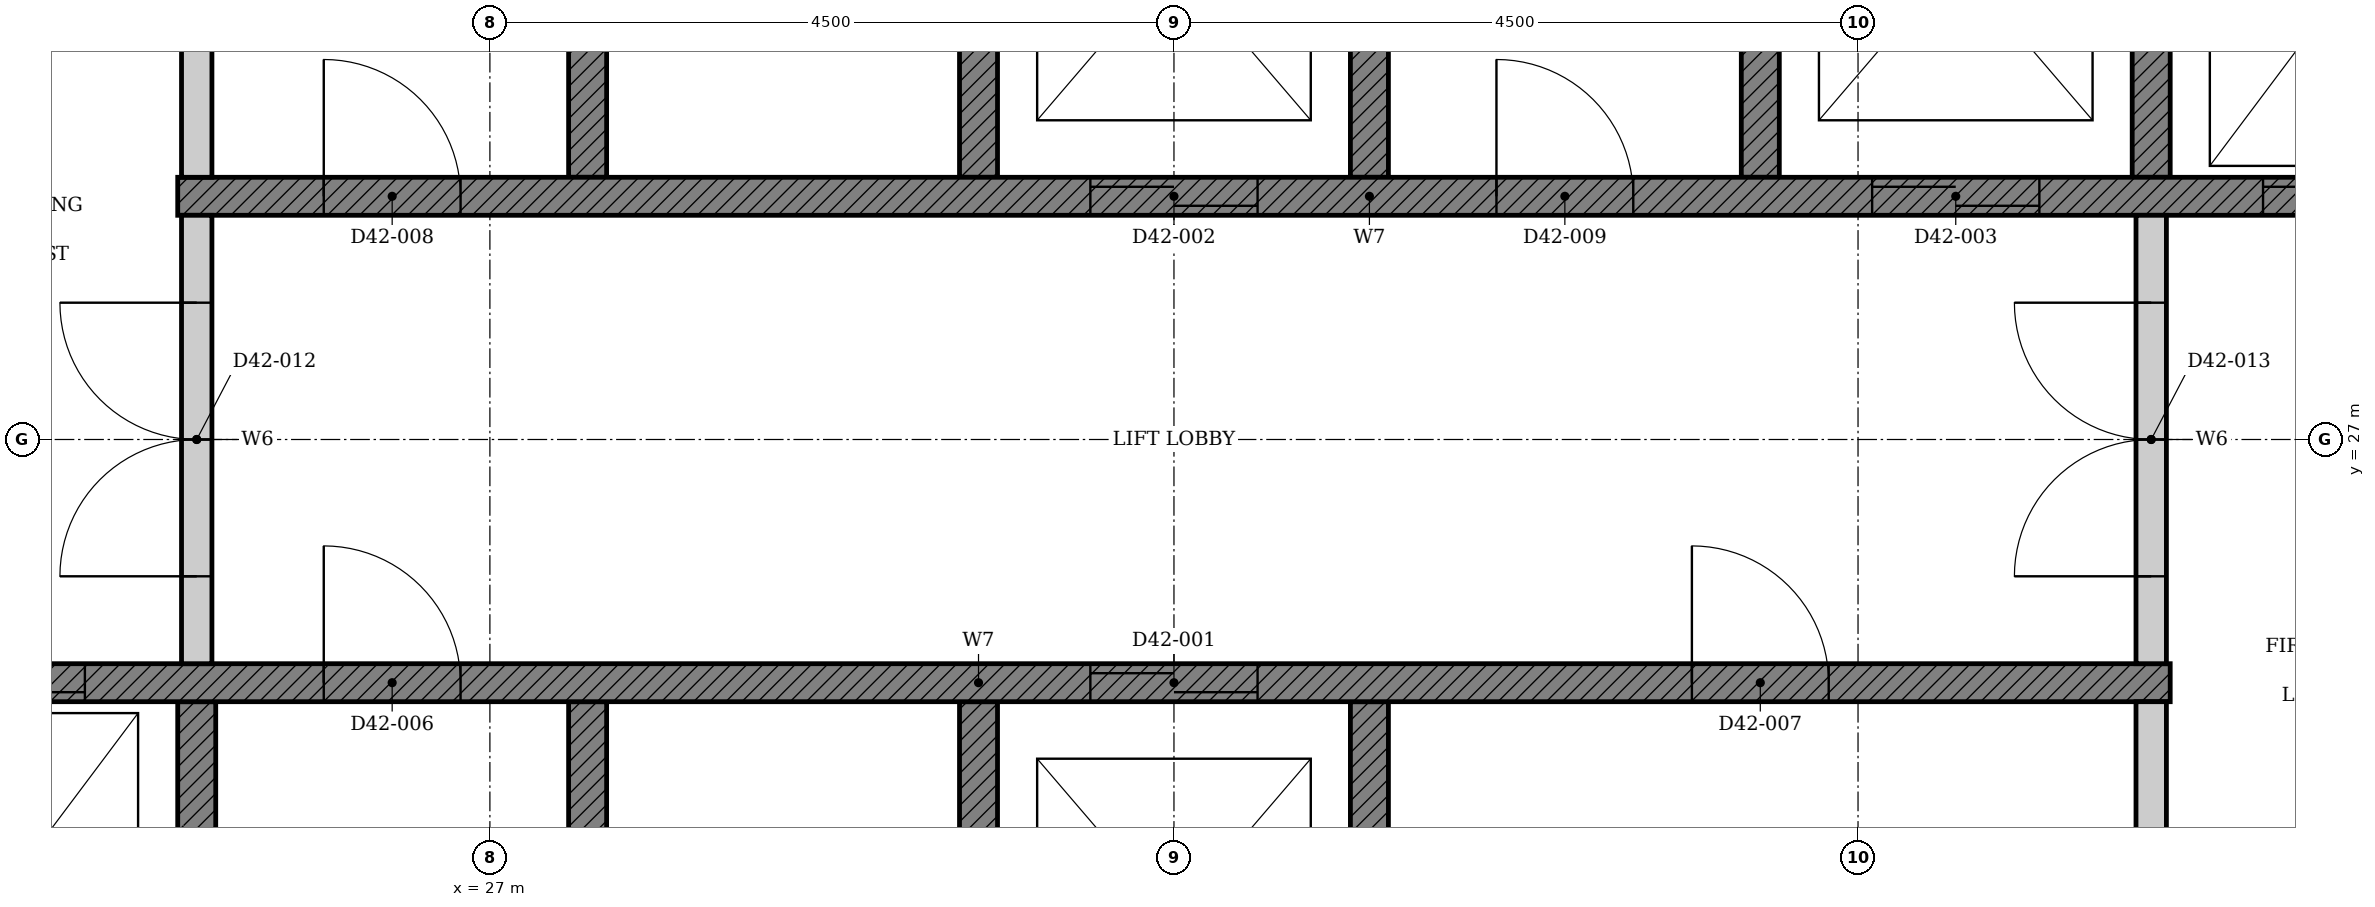
"""IFC4 building model, lengths in metres.
Left out: names, types, materials, properties, quantities, classifications, styles, units other than length and angle.
Written with IfcOpenShell. Run it as: python <this file> out.ifc"""

import sys

from ifc_helpers import new_model, si_unit, direction, frame, frame_2d, origin, place, context, subcontext, project, spatial, polyline, rectangle, outline, extrude, element, fill, save


model = new_model("IFC4")
c1 = context("Model", 3, precision=1e-05, world=origin(), true_north=direction((0.0, 1.0)))
c2 = subcontext(c1, "Body", "Model", "MODEL_VIEW")
j1 = project(units=[si_unit("LENGTHUNIT", "METRE"), si_unit("PLANEANGLEUNIT", "RADIAN")], contexts=[c1])
p1 = place(None, origin())
s1 = spatial("IfcSite", under=j1, at=p1, CompositionType="ELEMENT")
p2 = place(p1, origin())
s2 = spatial("IfcBuilding", under=s1, at=p2, CompositionType="ELEMENT")
p3 = place(p2, frame((0.0, 0.0, 169.1)))
s3 = spatial("IfcBuildingStorey", under=s2, at=p3, CompositionType="ELEMENT", Elevation=169.1)
p4 = place(p3, origin())
e1 = element("IfcWall", 1, at=p4, inside=s3, PredefinedType="SHEAR", context=c2, shape_type="SweptSolid", body=[
    extrude(outline(polyline([(22.375, 22.35), (25.197, 22.35), (25.197, 25.275), (24.947, 25.275), (24.947, 22.65), (22.625, 22.65), (22.625, 25.275), (22.375, 25.275), (22.375, 22.35)])), origin(), (0.0, 0.0, 1.0), 3.4),
])
p5 = place(p3, origin())
e2 = element("IfcWall", 2, at=p5, inside=s3, PredefinedType="SHEAR", context=c2, shape_type="SweptSolid", body=[
    extrude(outline(polyline([(27.518, 22.35), (32.911, 22.35), (32.911, 25.275), (32.661, 25.275), (32.661, 22.65), (30.339, 22.65), (30.339, 25.275), (30.089, 25.275), (30.089, 22.65), (27.768, 22.65), (27.768, 25.275), (27.518, 25.275), (27.518, 22.35)])), origin(), (0.0, 0.0, 1.0), 3.4),
])
p6 = place(p3, origin())
e3 = element("IfcWall", 3, at=p6, inside=s3, PredefinedType="SHEAR", context=c2, shape_type="SweptSolid", body=[
    extrude(outline(polyline([(27.518, 28.725), (27.768, 28.725), (27.768, 31.35), (30.089, 31.35), (30.089, 28.725), (30.339, 28.725), (30.339, 31.35), (32.661, 31.35), (32.661, 28.725), (32.911, 28.725), (32.911, 31.65), (27.518, 31.65), (27.518, 28.725)])), origin(), (0.0, 0.0, 1.0), 3.4),
])
p7 = place(p3, origin())
e4 = element("IfcWall", 4, at=p7, inside=s3, PredefinedType="SHEAR", context=c2, shape_type="SweptSolid", body=[
    extrude(outline(polyline([(35.232, 28.725), (35.482, 28.725), (35.482, 31.35), (37.803, 31.35), (37.803, 28.725), (38.053, 28.725), (38.053, 31.35), (40.375, 31.35), (40.375, 28.725), (40.625, 28.725), (40.625, 31.65), (35.232, 31.65), (35.232, 28.725)])), origin(), (0.0, 0.0, 1.0), 3.4),
])
p8 = place(p3, frame((22.375, 25.4, 0.0), z_axis=(0.0, 0.0, 1.0), x_axis=(1.0, 0.0, 0.0)))
e5 = element("IfcWall", 5, at=p8, inside=s3, PredefinedType="SHEAR", context=c2, shape_type="SweptSolid", body=[
    extrude(rectangle(XDim=15.678, YDim=0.25, at=frame_2d((7.839, 0.0))), origin(), (0.0, 0.0, 1.0), 3.4),
])
p9 = place(p8, frame((8.575, 0.0, 0.0)))
e6 = element("IfcOpeningElement", 6, at=p9, cuts=e5, PredefinedType="OPENING", context=c2, shape_type="SweptSolid", body=[
    extrude(rectangle(XDim=1.1, YDim=2.1, at=frame_2d((0.55, 1.05))), frame((0.0, 0.135, 0.0), z_axis=(0.0, -1.0, 0.0), x_axis=(1.0, 0.0, 0.0)), (0.0, 0.0, 1.0), 0.27),
])
p10 = place(p8, frame((0.861, 0.0, 0.0)))
e7 = element("IfcOpeningElement", 7, at=p10, cuts=e5, PredefinedType="OPENING", context=c2, shape_type="SweptSolid", body=[
    extrude(rectangle(XDim=1.1, YDim=2.1, at=frame_2d((0.55, 1.05))), frame((0.0, 0.135, 0.0), z_axis=(0.0, -1.0, 0.0), x_axis=(1.0, 0.0, 0.0)), (0.0, 0.0, 1.0), 0.27),
])
p11 = place(p8, frame((3.532, 0.0, 0.0)))
e8 = element("IfcOpeningElement", 8, at=p11, cuts=e5, PredefinedType="OPENING", context=c2, shape_type="SweptSolid", body=[
    extrude(rectangle(XDim=0.9, YDim=2.1, at=frame_2d((0.45, 1.05))), frame((0.0, 0.135, 0.0), z_axis=(0.0, -1.0, 0.0), x_axis=(1.0, 0.0, 0.0)), (0.0, 0.0, 1.0), 0.27),
])
p12 = place(p8, frame((12.532, 0.0, 0.0)))
e9 = element("IfcOpeningElement", 9, at=p12, cuts=e5, PredefinedType="OPENING", context=c2, shape_type="SweptSolid", body=[
    extrude(rectangle(XDim=0.9, YDim=2.1, at=frame_2d((0.45, 1.05))), frame((0.0, 0.135, 0.0), z_axis=(0.0, -1.0, 0.0), x_axis=(1.0, 0.0, 0.0)), (0.0, 0.0, 1.0), 0.27),
])
p13 = place(p3, frame((24.947, 28.6, 0.0), z_axis=(0.0, 0.0, 1.0), x_axis=(1.0, 0.0, 0.0)))
e10 = element("IfcWall", 10, at=p13, inside=s3, PredefinedType="SHEAR", context=c2, shape_type="SweptSolid", body=[
    extrude(rectangle(XDim=15.678, YDim=0.25, at=frame_2d((7.839, 0.0))), origin(), (0.0, 0.0, 1.0), 3.4),
])
p14 = place(p13, frame((6.004, 0.0, 0.0)))
e11 = element("IfcOpeningElement", 11, at=p14, cuts=e10, PredefinedType="OPENING", context=c2, shape_type="SweptSolid", body=[
    extrude(rectangle(XDim=1.1, YDim=2.1, at=frame_2d((0.55, 1.05))), frame((0.0, 0.135, 0.0), z_axis=(0.0, -1.0, 0.0), x_axis=(1.0, 0.0, 0.0)), (0.0, 0.0, 1.0), 0.27),
])
p15 = place(p13, frame((11.146, 0.0, 0.0)))
e12 = element("IfcOpeningElement", 12, at=p15, cuts=e10, PredefinedType="OPENING", context=c2, shape_type="SweptSolid", body=[
    extrude(rectangle(XDim=1.1, YDim=2.1, at=frame_2d((0.55, 1.05))), frame((0.0, 0.135, 0.0), z_axis=(0.0, -1.0, 0.0), x_axis=(1.0, 0.0, 0.0)), (0.0, 0.0, 1.0), 0.27),
])
p16 = place(p13, frame((13.718, 0.0, 0.0)))
e13 = element("IfcOpeningElement", 13, at=p16, cuts=e10, PredefinedType="OPENING", context=c2, shape_type="SweptSolid", body=[
    extrude(rectangle(XDim=1.1, YDim=2.1, at=frame_2d((0.55, 1.05))), frame((0.0, 0.135, 0.0), z_axis=(0.0, -1.0, 0.0), x_axis=(1.0, 0.0, 0.0)), (0.0, 0.0, 1.0), 0.27),
])
p17 = place(p13, frame((0.961, 0.0, 0.0)))
e14 = element("IfcOpeningElement", 14, at=p17, cuts=e10, PredefinedType="OPENING", context=c2, shape_type="SweptSolid", body=[
    extrude(rectangle(XDim=0.9, YDim=2.1, at=frame_2d((0.45, 1.05))), frame((0.0, 0.135, 0.0), z_axis=(0.0, -1.0, 0.0), x_axis=(1.0, 0.0, 0.0)), (0.0, 0.0, 1.0), 0.27),
])
p18 = place(p13, frame((8.675, 0.0, 0.0)))
e15 = element("IfcOpeningElement", 15, at=p18, cuts=e10, PredefinedType="OPENING", context=c2, shape_type="SweptSolid", body=[
    extrude(rectangle(XDim=0.9, YDim=2.1, at=frame_2d((0.45, 1.05))), frame((0.0, 0.135, 0.0), z_axis=(0.0, -1.0, 0.0), x_axis=(1.0, 0.0, 0.0)), (0.0, 0.0, 1.0), 0.27),
])
for number, where, z_axis, x_axis in (
    (16, (37.928, 22.65, 0.0), (0.0, 0.0, 1.0), (0.0, 1.0, 0.0)),
    (17, (25.072, 28.725, 0.0), (0.0, 0.0, 1.0), (0.0, 1.0, 0.0)),
):
    element("IfcWall", number, at=place(p3, frame(where, z_axis=z_axis, x_axis=x_axis)), inside=s3, PredefinedType="PARTITIONING", context=c2, shape_type="SweptSolid", body=[
        extrude(rectangle(XDim=2.625, YDim=0.2, at=frame_2d((1.312, 0.0))), origin(), (0.0, 0.0, 1.0), 3.4),
    ])
p19 = place(p3, frame((25.072, 25.525, 0.0), z_axis=(0.0, 0.0, 1.0), x_axis=(0.0, 1.0, 0.0)))
e18 = element("IfcWall", 18, at=p19, inside=s3, PredefinedType="PARTITIONING", context=c2, shape_type="SweptSolid", body=[
    extrude(rectangle(XDim=2.95, YDim=0.2, at=frame_2d((1.475, 0.0))), origin(), (0.0, 0.0, 1.0), 3.4),
])
p20 = place(p19, frame((0.575, 0.0, 0.0)))
e19 = element("IfcOpeningElement", 19, at=p20, cuts=e18, PredefinedType="OPENING", context=c2, shape_type="SweptSolid", body=[
    extrude(rectangle(XDim=1.8, YDim=2.1, at=frame_2d((0.9, 1.05))), frame((0.0, 0.11, 0.0), z_axis=(0.0, -1.0, 0.0), x_axis=(1.0, 0.0, 0.0)), (0.0, 0.0, 1.0), 0.22),
])
p21 = place(p3, frame((37.928, 25.525, 0.0), z_axis=(0.0, 0.0, 1.0), x_axis=(0.0, 1.0, 0.0)))
e20 = element("IfcWall", 20, at=p21, inside=s3, PredefinedType="PARTITIONING", context=c2, shape_type="SweptSolid", body=[
    extrude(rectangle(XDim=2.95, YDim=0.2, at=frame_2d((1.475, 0.0))), origin(), (0.0, 0.0, 1.0), 3.4),
])
p22 = place(p21, frame((0.575, 0.0, 0.0)))
e21 = element("IfcOpeningElement", 21, at=p22, cuts=e20, PredefinedType="OPENING", context=c2, shape_type="SweptSolid", body=[
    extrude(rectangle(XDim=1.8, YDim=2.1, at=frame_2d((0.9, 1.05))), frame((0.0, 0.11, 0.0), z_axis=(0.0, -1.0, 0.0), x_axis=(1.0, 0.0, 0.0)), (0.0, 0.0, 1.0), 0.22),
])
p23 = place(p9, origin())
e22 = element("IfcDoor", 22, at=p23, inside=s3, OperationType="DOUBLE_DOOR_SLIDING", PredefinedType="DOOR", context=c2, shape_type="SweptSolid", body=[
    extrude(rectangle(XDim=1.1, YDim=2.1, at=frame_2d((0.55, 1.05))), frame((0.0, 0.025, 0.0), z_axis=(0.0, -1.0, 0.0), x_axis=(1.0, 0.0, 0.0)), (0.0, 0.0, 1.0), 0.05),
])
fill(e6, e22)
p24 = place(p14, origin())
e23 = element("IfcDoor", 23, at=p24, inside=s3, OperationType="DOUBLE_DOOR_SLIDING", PredefinedType="DOOR", context=c2, shape_type="SweptSolid", body=[
    extrude(rectangle(XDim=1.1, YDim=2.1, at=frame_2d((0.55, 1.05))), frame((0.0, 0.025, 0.0), z_axis=(0.0, -1.0, 0.0), x_axis=(1.0, 0.0, 0.0)), (0.0, 0.0, 1.0), 0.05),
])
fill(e11, e23)
p25 = place(p15, origin())
e24 = element("IfcDoor", 24, at=p25, inside=s3, OperationType="DOUBLE_DOOR_SLIDING", PredefinedType="DOOR", context=c2, shape_type="SweptSolid", body=[
    extrude(rectangle(XDim=1.1, YDim=2.1, at=frame_2d((0.55, 1.05))), frame((0.0, 0.025, 0.0), z_axis=(0.0, -1.0, 0.0), x_axis=(1.0, 0.0, 0.0)), (0.0, 0.0, 1.0), 0.05),
])
fill(e12, e24)
p26 = place(p10, origin())
e25 = element("IfcDoor", 25, at=p26, inside=s3, OperationType="DOUBLE_DOOR_SLIDING", PredefinedType="DOOR", context=c2, shape_type="SweptSolid", body=[
    extrude(rectangle(XDim=1.1, YDim=2.1, at=frame_2d((0.55, 1.05))), frame((0.0, 0.025, 0.0), z_axis=(0.0, -1.0, 0.0), x_axis=(1.0, 0.0, 0.0)), (0.0, 0.0, 1.0), 0.05),
])
fill(e7, e25)
p27 = place(p16, origin())
e26 = element("IfcDoor", 26, at=p27, inside=s3, OperationType="DOUBLE_DOOR_SLIDING", PredefinedType="DOOR", context=c2, shape_type="SweptSolid", body=[
    extrude(rectangle(XDim=1.1, YDim=2.1, at=frame_2d((0.55, 1.05))), frame((0.0, 0.025, 0.0), z_axis=(0.0, -1.0, 0.0), x_axis=(1.0, 0.0, 0.0)), (0.0, 0.0, 1.0), 0.05),
])
fill(e13, e26)
p28 = place(p11, origin())
e27 = element("IfcDoor", 27, at=p28, inside=s3, OperationType="SINGLE_SWING_LEFT", PredefinedType="DOOR", context=c2, shape_type="SweptSolid", body=[
    extrude(rectangle(XDim=0.9, YDim=2.1, at=frame_2d((0.45, 1.05))), frame((0.0, 0.025, 0.0), z_axis=(0.0, -1.0, 0.0), x_axis=(1.0, 0.0, 0.0)), (0.0, 0.0, 1.0), 0.05),
])
fill(e8, e27)
p29 = place(p12, origin())
e28 = element("IfcDoor", 28, at=p29, inside=s3, OperationType="SINGLE_SWING_LEFT", PredefinedType="DOOR", context=c2, shape_type="SweptSolid", body=[
    extrude(rectangle(XDim=0.9, YDim=2.1, at=frame_2d((0.45, 1.05))), frame((0.0, 0.025, 0.0), z_axis=(0.0, -1.0, 0.0), x_axis=(1.0, 0.0, 0.0)), (0.0, 0.0, 1.0), 0.05),
])
fill(e9, e28)
p30 = place(p17, origin())
e29 = element("IfcDoor", 29, at=p30, inside=s3, OperationType="SINGLE_SWING_LEFT", PredefinedType="DOOR", context=c2, shape_type="SweptSolid", body=[
    extrude(rectangle(XDim=0.9, YDim=2.1, at=frame_2d((0.45, 1.05))), frame((0.0, 0.025, 0.0), z_axis=(0.0, -1.0, 0.0), x_axis=(1.0, 0.0, 0.0)), (0.0, 0.0, 1.0), 0.05),
])
fill(e14, e29)
p31 = place(p18, origin())
e30 = element("IfcDoor", 30, at=p31, inside=s3, OperationType="SINGLE_SWING_LEFT", PredefinedType="DOOR", context=c2, shape_type="SweptSolid", body=[
    extrude(rectangle(XDim=0.9, YDim=2.1, at=frame_2d((0.45, 1.05))), frame((0.0, 0.025, 0.0), z_axis=(0.0, -1.0, 0.0), x_axis=(1.0, 0.0, 0.0)), (0.0, 0.0, 1.0), 0.05),
])
fill(e15, e30)
p32 = place(p20, origin())
e31 = element("IfcDoor", 31, at=p32, inside=s3, OperationType="DOUBLE_DOOR_SINGLE_SWING", PredefinedType="DOOR", context=c2, shape_type="SweptSolid", body=[
    extrude(rectangle(XDim=1.8, YDim=2.1, at=frame_2d((0.9, 1.05))), frame((0.0, 0.025, 0.0), z_axis=(0.0, -1.0, 0.0), x_axis=(1.0, 0.0, 0.0)), (0.0, 0.0, 1.0), 0.05),
])
fill(e19, e31)
p33 = place(p22, origin())
e32 = element("IfcDoor", 32, at=p33, inside=s3, OperationType="DOUBLE_DOOR_SINGLE_SWING", PredefinedType="DOOR", context=c2, shape_type="SweptSolid", body=[
    extrude(rectangle(XDim=1.8, YDim=2.1, at=frame_2d((0.9, 1.05))), frame((0.0, 0.025, 0.0), z_axis=(0.0, -1.0, 0.0), x_axis=(1.0, 0.0, 0.0)), (0.0, 0.0, 1.0), 0.05),
])
fill(e21, e32)
save(model, sys.argv[1])
